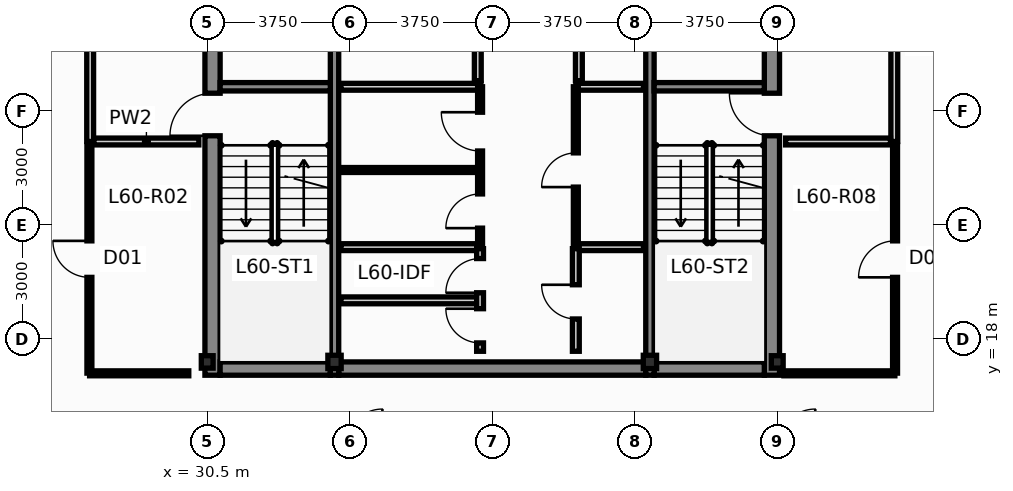
"""IFC4 building model, lengths in metres.
Left out: names, types, materials, properties, quantities, classifications, styles, units other than length and angle.
Written with IfcOpenShell. Run it as: python <this file> out.ifc"""

import sys

from ifc_helpers import new_model, si_unit, direction, frame, frame_2d, origin, origin_2d, place, context, subcontext, project, spatial, rectangle, hollow_rectangle, i_section, extrude, source, transform, mapped, element, fill, save


model = new_model("IFC4")
c1 = context("Model", 3, precision=1e-05, world=origin(), true_north=direction((0.0, 1.0)))
c2 = subcontext(c1, "Body", "Model", "MODEL_VIEW")
j1 = project(units=[si_unit("LENGTHUNIT", "METRE"), si_unit("PLANEANGLEUNIT", "RADIAN")], contexts=[c1])
p1 = place(None, origin())
s1 = spatial("IfcSite", under=j1, at=p1, CompositionType="ELEMENT")
p2 = place(p1, origin())
s2 = spatial("IfcBuilding", under=s1, at=p2, CompositionType="ELEMENT")
p3 = place(p2, frame((0.0, 0.0, 229.85)))
s3 = spatial("IfcBuildingStorey", under=s2, at=p3, CompositionType="ELEMENT", Elevation=229.85)
m1 = source(origin(), c2, "Body", "SweptSolid", [
    extrude(i_section(OverallWidth=0.311, OverallDepth=0.327, WebThickness=0.016, FlangeThickness=0.025, at=origin_2d()), origin(), (0.0, 0.0, 1.0), 3.65),
])
for number, where, z_axis, x_axis in (
    (1, (30.5, 17.4, 0.0), (0.0, 0.0, 1.0), (1.0, 0.0, 0.0)),
    (2, (45.5, 17.4, 0.0), (0.0, 0.0, 1.0), (1.0, 0.0, 0.0)),
):
    element("IfcColumn", number, at=place(p3, frame(where, z_axis=z_axis, x_axis=x_axis)), inside=s3, PredefinedType="COLUMN", context=c2, shape_type="MappedRepresentation", body=[
        mapped(m1, transform((0.0, 0.0, 0.0), scale=1.0)),
    ])
m2 = source(origin(), c2, "Body", "SweptSolid", [
    extrude(hollow_rectangle(XDim=0.35, YDim=0.35, WallThickness=0.016, at=origin_2d()), origin(), (0.0, 0.0, 1.0), 3.65),
])
for number, where, z_axis, x_axis in (
    (3, (33.85, 17.4, 0.0), (0.0, 0.0, 1.0), (1.0, 0.0, 0.0)),
    (4, (42.15, 17.4, 0.0), (0.0, 0.0, 1.0), (1.0, 0.0, 0.0)),
):
    element("IfcColumn", number, at=place(p3, frame(where, z_axis=z_axis, x_axis=x_axis)), inside=s3, PredefinedType="COLUMN", context=c2, shape_type="MappedRepresentation", body=[
        mapped(m2, transform((0.0, 0.0, 0.0), scale=1.0)),
    ])
p4 = place(p3, frame((30.64, 17.05, 0.0), z_axis=(0.0, 0.0, 1.0), x_axis=(0.0, 1.0, 0.0)))
e5 = element("IfcWall", 5, at=p4, inside=s3, PredefinedType="SHEAR", context=c2, shape_type="SweptSolid", body=[
    extrude(rectangle(XDim=13.125, YDim=0.4, at=frame_2d((6.562, 0.0))), origin(), (0.0, 0.0, 1.0), 3.65),
])
p5 = place(p4, frame((6.3, 0.0, 0.0)))
e6 = element("IfcOpeningElement", 6, at=p5, cuts=e5, PredefinedType="OPENING", context=c2, shape_type="SweptSolid", body=[
    extrude(rectangle(XDim=1.12, YDim=2.15, at=frame_2d((0.56, 1.075))), frame((0.0, 0.212, 0.0), z_axis=(0.0, -1.0, 0.0), x_axis=(1.0, 0.0, 0.0)), (0.0, 0.0, 1.0), 0.424),
])
p6 = place(p4, frame((10.75, 0.0, 0.0)))
e7 = element("IfcOpeningElement", 7, at=p6, cuts=e5, PredefinedType="OPENING", context=c2, shape_type="SweptSolid", body=[
    extrude(rectangle(XDim=1.2, YDim=2.2, at=frame_2d((0.6, 1.1))), frame((0.0, 0.212, 0.0), z_axis=(0.0, -1.0, 0.0), x_axis=(1.0, 0.0, 0.0)), (0.0, 0.0, 1.0), 0.424),
])
p7 = place(p3, frame((45.36, 17.05, 0.0), z_axis=(0.0, 0.0, 1.0), x_axis=(0.0, 1.0, 0.0)))
e8 = element("IfcWall", 8, at=p7, inside=s3, PredefinedType="SHEAR", context=c2, shape_type="SweptSolid", body=[
    extrude(rectangle(XDim=13.125, YDim=0.4, at=frame_2d((6.562, 0.0))), origin(), (0.0, 0.0, 1.0), 3.65),
])
p8 = place(p7, frame((6.3, 0.0, 0.0)))
e9 = element("IfcOpeningElement", 9, at=p8, cuts=e8, PredefinedType="OPENING", context=c2, shape_type="SweptSolid", body=[
    extrude(rectangle(XDim=1.12, YDim=2.15, at=frame_2d((0.56, 1.075))), frame((0.0, 0.212, 0.0), z_axis=(0.0, -1.0, 0.0), x_axis=(1.0, 0.0, 0.0)), (0.0, 0.0, 1.0), 0.424),
])
p9 = place(p7, frame((10.75, 0.0, 0.0)))
e10 = element("IfcOpeningElement", 10, at=p9, cuts=e8, PredefinedType="OPENING", context=c2, shape_type="SweptSolid", body=[
    extrude(rectangle(XDim=1.2, YDim=2.2, at=frame_2d((0.6, 1.1))), frame((0.0, 0.212, 0.0), z_axis=(0.0, -1.0, 0.0), x_axis=(1.0, 0.0, 0.0)), (0.0, 0.0, 1.0), 0.424),
])
p10 = place(p3, frame((30.84, 17.225, 0.0), z_axis=(0.0, 0.0, 1.0), x_axis=(1.0, 0.0, 0.0)))
e11 = element("IfcWall", 11, at=p10, inside=s3, PredefinedType="SHEAR", context=c2, shape_type="SweptSolid", body=[
    extrude(rectangle(XDim=2.9, YDim=0.35, at=frame_2d((1.45, 0.0))), origin(), (0.0, 0.0, 1.0), 3.65),
])
p11 = place(p3, frame((33.96, 17.225, 0.0), z_axis=(0.0, 0.0, 1.0), x_axis=(1.0, 0.0, 0.0)))
e12 = element("IfcWall", 12, at=p11, inside=s3, PredefinedType="SHEAR", context=c2, shape_type="SweptSolid", body=[
    extrude(rectangle(XDim=8.08, YDim=0.35, at=frame_2d((4.04, 0.0))), origin(), (0.0, 0.0, 1.0), 3.65),
])
p12 = place(p3, frame((42.26, 17.225, 0.0), z_axis=(0.0, 0.0, 1.0), x_axis=(1.0, 0.0, 0.0)))
e13 = element("IfcWall", 13, at=p12, inside=s3, PredefinedType="SHEAR", context=c2, shape_type="SweptSolid", body=[
    extrude(rectangle(XDim=2.9, YDim=0.35, at=frame_2d((1.45, 0.0))), origin(), (0.0, 0.0, 1.0), 3.65),
])
for number, where, z_axis, x_axis in (
    (14, (33.85, 17.05, 0.0), (0.0, 0.0, 1.0), (0.0, 1.0, 0.0)),
    (15, (42.15, 17.05, 0.0), (0.0, 0.0, 1.0), (0.0, 1.0, 0.0)),
):
    element("IfcWall", number, at=place(p3, frame(where, z_axis=z_axis, x_axis=x_axis)), inside=s3, PredefinedType="SHEAR", context=c2, shape_type="SweptSolid", body=[
        extrude(rectangle(XDim=13.125, YDim=0.22, at=frame_2d((6.562, 0.0))), origin(), (0.0, 0.0, 1.0), 3.65),
    ])
for number, where, z_axis, x_axis in (
    (16, (30.84, 24.64, 0.0), (0.0, 0.0, 1.0), (1.0, 0.0, 0.0)),
    (17, (42.26, 24.64, 0.0), (0.0, 0.0, 1.0), (1.0, 0.0, 0.0)),
):
    element("IfcWall", number, at=place(p3, frame(where, z_axis=z_axis, x_axis=x_axis)), inside=s3, PredefinedType="SHEAR", context=c2, shape_type="SweptSolid", body=[
        extrude(rectangle(XDim=2.9, YDim=0.22, at=frame_2d((1.45, 0.0))), origin(), (0.0, 0.0, 1.0), 3.65),
    ])
for number, where, z_axis, x_axis in (
    (18, (37.62, 24.8, 0.0), (0.0, 0.0, 1.0), (0.0, 1.0, 0.0)),
    (19, (40.28, 24.8, 0.0), (0.0, 0.0, 1.0), (0.0, 1.0, 0.0)),
):
    element("IfcWall", number, at=place(p3, frame(where, z_axis=z_axis, x_axis=x_axis)), inside=s3, PredefinedType="PARTITIONING", context=c2, shape_type="SweptSolid", body=[
        extrude(rectangle(XDim=2.0, YDim=0.18, at=frame_2d((1.0, 0.0))), origin(), (0.0, 0.0, 1.0), 3.4),
    ])
p13 = place(p3, frame((34.02, 24.64, 0.0), z_axis=(0.0, 0.0, 1.0), x_axis=(1.0, 0.0, 0.0)))
e20 = element("IfcWall", 20, at=p13, inside=s3, PredefinedType="PARTITIONING", context=c2, shape_type="SweptSolid", body=[
    extrude(rectangle(XDim=3.68, YDim=0.18, at=frame_2d((1.84, 0.0))), origin(), (0.0, 0.0, 1.0), 3.4),
])
p14 = place(p3, frame((40.2, 24.64, 0.0), z_axis=(0.0, 0.0, 1.0), x_axis=(1.0, 0.0, 0.0)))
e21 = element("IfcWall", 21, at=p14, inside=s3, PredefinedType="PARTITIONING", context=c2, shape_type="SweptSolid", body=[
    extrude(rectangle(XDim=1.78, YDim=0.18, at=frame_2d((0.89, 0.0))), origin(), (0.0, 0.0, 1.0), 3.4),
])
p15 = place(p3, frame((27.42, 23.2, 0.0), z_axis=(0.0, 0.0, 1.0), x_axis=(0.0, 1.0, 0.0)))
e22 = element("IfcWall", 22, at=p15, inside=s3, PredefinedType="PARTITIONING", context=c2, shape_type="SweptSolid", body=[
    extrude(rectangle(XDim=6.4, YDim=0.18, at=frame_2d((3.2, 0.0))), origin(), (0.0, 0.0, 1.0), 3.129),
])
p16 = place(p15, frame((2.65, 0.0, 0.0)))
e23 = element("IfcOpeningElement", 23, at=p16, cuts=e22, PredefinedType="OPENING", context=c2, shape_type="SweptSolid", body=[
    extrude(rectangle(XDim=1.05, YDim=2.15, at=frame_2d((0.525, 1.075))), frame((0.0, 0.102, 0.0), z_axis=(0.0, -1.0, 0.0), x_axis=(1.0, 0.0, 0.0)), (0.0, 0.0, 1.0), 0.204),
])
p17 = place(p3, frame((27.52, 23.2, 0.0), z_axis=(0.0, 0.0, 1.0), x_axis=(1.0, 0.0, 0.0)))
e24 = element("IfcWall", 24, at=p17, inside=s3, PredefinedType="PARTITIONING", context=c2, shape_type="SweptSolid", body=[
    extrude(rectangle(XDim=2.76, YDim=0.18, at=frame_2d((1.38, 0.0))), origin(), (0.0, 0.0, 1.0), 3.4),
])
p18 = place(p3, frame((48.58, 23.2, 0.0), z_axis=(0.0, 0.0, 1.0), x_axis=(0.0, 1.0, 0.0)))
e25 = element("IfcWall", 25, at=p18, inside=s3, PredefinedType="PARTITIONING", context=c2, shape_type="SweptSolid", body=[
    extrude(rectangle(XDim=6.4, YDim=0.18, at=frame_2d((3.2, 0.0))), origin(), (0.0, 0.0, 1.0), 3.129),
])
p19 = place(p18, frame((2.65, 0.0, 0.0)))
e26 = element("IfcOpeningElement", 26, at=p19, cuts=e25, PredefinedType="OPENING", context=c2, shape_type="SweptSolid", body=[
    extrude(rectangle(XDim=1.05, YDim=2.15, at=frame_2d((0.525, 1.075))), frame((0.0, 0.102, 0.0), z_axis=(0.0, -1.0, 0.0), x_axis=(1.0, 0.0, 0.0)), (0.0, 0.0, 1.0), 0.204),
])
p20 = place(p3, frame((45.72, 23.2, 0.0), z_axis=(0.0, 0.0, 1.0), x_axis=(1.0, 0.0, 0.0)))
e27 = element("IfcWall", 27, at=p20, inside=s3, PredefinedType="PARTITIONING", context=c2, shape_type="SweptSolid", body=[
    extrude(rectangle(XDim=2.76, YDim=0.18, at=frame_2d((1.38, 0.0))), origin(), (0.0, 0.0, 1.0), 3.4),
])
p21 = place(p3, frame((34.02, 20.42, 0.0), z_axis=(0.0, 0.0, 1.0), x_axis=(1.0, 0.0, 0.0)))
e28 = element("IfcWall", 28, at=p21, inside=s3, PredefinedType="PARTITIONING", context=c2, shape_type="SweptSolid", body=[
    extrude(rectangle(XDim=3.64, YDim=0.18, at=frame_2d((1.82, 0.0))), origin(), (0.0, 0.0, 1.0), 3.4),
])
p22 = place(p3, frame((40.22, 20.42, 0.0), z_axis=(0.0, 0.0, 1.0), x_axis=(1.0, 0.0, 0.0)))
e29 = element("IfcWall", 29, at=p22, inside=s3, PredefinedType="PARTITIONING", context=c2, shape_type="SweptSolid", body=[
    extrude(rectangle(XDim=1.76, YDim=0.18, at=frame_2d((0.88, 0.0))), origin(), (0.0, 0.0, 1.0), 3.4),
])
p23 = place(p3, frame((34.02, 22.45, 0.0), z_axis=(0.0, 0.0, 1.0), x_axis=(1.0, 0.0, 0.0)))
e30 = element("IfcWall", 30, at=p23, inside=s3, PredefinedType="PARTITIONING", context=c2, shape_type="SweptSolid", body=[
    extrude(rectangle(XDim=3.58, YDim=0.13, at=frame_2d((1.79, 0.0))), origin(), (0.0, 0.0, 1.0), 3.4),
])
p24 = place(p3, frame((37.68, 20.5, 0.0), z_axis=(0.0, 0.0, 1.0), x_axis=(0.0, 1.0, 0.0)))
e31 = element("IfcWall", 31, at=p24, inside=s3, PredefinedType="PARTITIONING", context=c2, shape_type="SweptSolid", body=[
    extrude(rectangle(XDim=4.14, YDim=0.13, at=frame_2d((2.07, 0.0))), origin(), (0.0, 0.0, 1.0), 3.4),
])
p25 = place(p24, frame((0.42, 0.0, 0.0)))
e32 = element("IfcOpeningElement", 32, at=p25, cuts=e31, PredefinedType="OPENING", context=c2, shape_type="SweptSolid", body=[
    extrude(rectangle(XDim=0.9, YDim=2.1, at=frame_2d((0.45, 1.05))), frame((0.0, 0.077, 0.0), z_axis=(0.0, -1.0, 0.0), x_axis=(1.0, 0.0, 0.0)), (0.0, 0.0, 1.0), 0.154),
])
p26 = place(p24, frame((2.45, 0.0, 0.0)))
e33 = element("IfcOpeningElement", 33, at=p26, cuts=e31, PredefinedType="OPENING", context=c2, shape_type="SweptSolid", body=[
    extrude(rectangle(XDim=1.02, YDim=2.15, at=frame_2d((0.51, 1.075))), frame((0.0, 0.077, 0.0), z_axis=(0.0, -1.0, 0.0), x_axis=(1.0, 0.0, 0.0)), (0.0, 0.0, 1.0), 0.154),
])
p27 = place(p3, frame((40.2, 20.5, 0.0), z_axis=(0.0, 0.0, 1.0), x_axis=(0.0, 1.0, 0.0)))
e34 = element("IfcWall", 34, at=p27, inside=s3, PredefinedType="PARTITIONING", context=c2, shape_type="SweptSolid", body=[
    extrude(rectangle(XDim=4.14, YDim=0.13, at=frame_2d((2.07, 0.0))), origin(), (0.0, 0.0, 1.0), 3.4),
])
p28 = place(p27, frame((1.5, 0.0, 0.0)))
e35 = element("IfcOpeningElement", 35, at=p28, cuts=e34, PredefinedType="OPENING", context=c2, shape_type="SweptSolid", body=[
    extrude(rectangle(XDim=0.9, YDim=2.1, at=frame_2d((0.45, 1.05))), frame((0.0, 0.077, 0.0), z_axis=(0.0, -1.0, 0.0), x_axis=(1.0, 0.0, 0.0)), (0.0, 0.0, 1.0), 0.154),
])
p29 = place(p3, frame((34.02, 19.02, 0.0), z_axis=(0.0, 0.0, 1.0), x_axis=(1.0, 0.0, 0.0)))
e36 = element("IfcWall", 36, at=p29, inside=s3, PredefinedType="PARTITIONING", context=c2, shape_type="SweptSolid", body=[
    extrude(rectangle(XDim=3.58, YDim=0.18, at=frame_2d((1.79, 0.0))), origin(), (0.0, 0.0, 1.0), 3.4),
])
p30 = place(p3, frame((37.68, 17.68, 0.0), z_axis=(0.0, 0.0, 1.0), x_axis=(0.0, 1.0, 0.0)))
e37 = element("IfcWall", 37, at=p30, inside=s3, PredefinedType="PARTITIONING", context=c2, shape_type="SweptSolid", body=[
    extrude(rectangle(XDim=2.7, YDim=0.18, at=frame_2d((1.35, 0.0))), origin(), (0.0, 0.0, 1.0), 3.4),
])
p31 = place(p30, frame((0.22, 0.0, 0.0)))
e38 = element("IfcOpeningElement", 38, at=p31, cuts=e37, PredefinedType="OPENING", context=c2, shape_type="SweptSolid", body=[
    extrude(rectangle(XDim=0.9, YDim=2.1, at=frame_2d((0.45, 1.05))), frame((0.0, 0.102, 0.0), z_axis=(0.0, -1.0, 0.0), x_axis=(1.0, 0.0, 0.0)), (0.0, 0.0, 1.0), 0.204),
])
p32 = place(p30, frame((1.54, 0.0, 0.0)))
e39 = element("IfcOpeningElement", 39, at=p32, cuts=e37, PredefinedType="OPENING", context=c2, shape_type="SweptSolid", body=[
    extrude(rectangle(XDim=0.9, YDim=2.1, at=frame_2d((0.45, 1.05))), frame((0.0, 0.102, 0.0), z_axis=(0.0, -1.0, 0.0), x_axis=(1.0, 0.0, 0.0)), (0.0, 0.0, 1.0), 0.204),
])
p33 = place(p3, frame((40.2, 17.68, 0.0), z_axis=(0.0, 0.0, 1.0), x_axis=(0.0, 1.0, 0.0)))
e40 = element("IfcWall", 40, at=p33, inside=s3, PredefinedType="PARTITIONING", context=c2, shape_type="SweptSolid", body=[
    extrude(rectangle(XDim=2.7, YDim=0.18, at=frame_2d((1.35, 0.0))), origin(), (0.0, 0.0, 1.0), 3.4),
])
p34 = place(p33, frame((0.85, 0.0, 0.0)))
e41 = element("IfcOpeningElement", 41, at=p34, cuts=e40, PredefinedType="OPENING", context=c2, shape_type="SweptSolid", body=[
    extrude(rectangle(XDim=0.9, YDim=2.1, at=frame_2d((0.45, 1.05))), frame((0.0, 0.102, 0.0), z_axis=(0.0, -1.0, 0.0), x_axis=(1.0, 0.0, 0.0)), (0.0, 0.0, 1.0), 0.204),
])
p35 = place(p3, frame((27.4, 17.105, 0.0), z_axis=(0.0, 0.0, 1.0), x_axis=(0.0, 1.0, 0.0)))
e42 = element("IfcWall", 42, at=p35, inside=s3, PredefinedType="PARTITIONING", context=c2, shape_type="SweptSolid", body=[
    extrude(rectangle(XDim=6.0, YDim=0.13, at=frame_2d((3.0, 0.0))), origin(), (0.0, 0.0, 1.0), 3.4),
])
p36 = place(p35, frame((2.52, 0.0, 0.0)))
e43 = element("IfcOpeningElement", 43, at=p36, cuts=e42, PredefinedType="OPENING", context=c2, shape_type="SweptSolid", body=[
    extrude(rectangle(XDim=0.96, YDim=2.15, at=frame_2d((0.48, 1.075))), frame((0.0, 0.077, 0.0), z_axis=(0.0, -1.0, 0.0), x_axis=(1.0, 0.0, 0.0)), (0.0, 0.0, 1.0), 0.154),
])
p37 = place(p3, frame((48.6, 17.105, 0.0), z_axis=(0.0, 0.0, 1.0), x_axis=(0.0, 1.0, 0.0)))
e44 = element("IfcWall", 44, at=p37, inside=s3, PredefinedType="PARTITIONING", context=c2, shape_type="SweptSolid", body=[
    extrude(rectangle(XDim=6.0, YDim=0.13, at=frame_2d((3.0, 0.0))), origin(), (0.0, 0.0, 1.0), 3.4),
])
p38 = place(p37, frame((2.52, 0.0, 0.0)))
e45 = element("IfcOpeningElement", 45, at=p38, cuts=e44, PredefinedType="OPENING", context=c2, shape_type="SweptSolid", body=[
    extrude(rectangle(XDim=0.96, YDim=2.15, at=frame_2d((0.48, 1.075))), frame((0.0, 0.077, 0.0), z_axis=(0.0, -1.0, 0.0), x_axis=(1.0, 0.0, 0.0)), (0.0, 0.0, 1.0), 0.154),
])
p39 = place(p3, frame((45.675, 17.1, 0.0), z_axis=(0.0, 0.0, 1.0), x_axis=(1.0, 0.0, 0.0)))
e46 = element("IfcWall", 46, at=p39, inside=s3, PredefinedType="PARTITIONING", context=c2, shape_type="SweptSolid", body=[
    extrude(rectangle(XDim=2.92, YDim=0.13, at=frame_2d((1.46, 0.0))), origin(), (0.0, 0.0, 1.0), 2.985),
])
p40 = place(p3, frame((30.015, 17.1, 0.0), z_axis=(0.0, 0.0, 1.0), x_axis=(-1.0, 0.0, 0.0)))
e47 = element("IfcWall", 47, at=p40, inside=s3, PredefinedType="PARTITIONING", context=c2, shape_type="SweptSolid", body=[
    extrude(rectangle(XDim=2.61, YDim=0.13, at=frame_2d((1.305, 0.0))), origin(), (0.0, 0.0, 1.0), 2.985),
])
p41 = place(p5, origin())
e48 = element("IfcDoor", 48, at=p41, inside=s3, OperationType="SINGLE_SWING_LEFT", PredefinedType="DOOR", context=c2, shape_type="SweptSolid", body=[
    extrude(rectangle(XDim=1.12, YDim=2.15, at=frame_2d((0.56, 1.075))), frame((0.0, 0.025, 0.0), z_axis=(0.0, -1.0, 0.0), x_axis=(1.0, 0.0, 0.0)), (0.0, 0.0, 1.0), 0.05),
])
fill(e6, e48)
p42 = place(p8, origin())
e49 = element("IfcDoor", 49, at=p42, inside=s3, OperationType="SINGLE_SWING_RIGHT", PredefinedType="DOOR", context=c2, shape_type="SweptSolid", body=[
    extrude(rectangle(XDim=1.12, YDim=2.15, at=frame_2d((0.56, 1.075))), frame((0.0, 0.025, 0.0), z_axis=(0.0, -1.0, 0.0), x_axis=(1.0, 0.0, 0.0)), (0.0, 0.0, 1.0), 0.05),
])
fill(e9, e49)
p43 = place(p25, origin())
e50 = element("IfcDoor", 50, at=p43, inside=s3, OperationType="SINGLE_SWING_LEFT", PredefinedType="DOOR", context=c2, shape_type="SweptSolid", body=[
    extrude(rectangle(XDim=0.9, YDim=2.1, at=frame_2d((0.45, 1.05))), frame((0.0, 0.025, 0.0), z_axis=(0.0, -1.0, 0.0), x_axis=(1.0, 0.0, 0.0)), (0.0, 0.0, 1.0), 0.05),
])
fill(e32, e50)
p44 = place(p26, origin())
e51 = element("IfcDoor", 51, at=p44, inside=s3, OperationType="SINGLE_SWING_RIGHT", PredefinedType="DOOR", context=c2, shape_type="SweptSolid", body=[
    extrude(rectangle(XDim=1.02, YDim=2.15, at=frame_2d((0.51, 1.075))), frame((0.0, 0.025, 0.0), z_axis=(0.0, -1.0, 0.0), x_axis=(1.0, 0.0, 0.0)), (0.0, 0.0, 1.0), 0.05),
])
fill(e33, e51)
p45 = place(p28, origin())
e52 = element("IfcDoor", 52, at=p45, inside=s3, OperationType="SINGLE_SWING_LEFT", PredefinedType="DOOR", context=c2, shape_type="SweptSolid", body=[
    extrude(rectangle(XDim=0.9, YDim=2.1, at=frame_2d((0.45, 1.05))), frame((0.0, 0.025, 0.0), z_axis=(0.0, -1.0, 0.0), x_axis=(1.0, 0.0, 0.0)), (0.0, 0.0, 1.0), 0.05),
])
fill(e35, e52)
p46 = place(p31, origin())
e53 = element("IfcDoor", 53, at=p46, inside=s3, OperationType="SINGLE_SWING_RIGHT", PredefinedType="DOOR", context=c2, shape_type="SweptSolid", body=[
    extrude(rectangle(XDim=0.9, YDim=2.1, at=frame_2d((0.45, 1.05))), frame((0.0, 0.025, 0.0), z_axis=(0.0, -1.0, 0.0), x_axis=(1.0, 0.0, 0.0)), (0.0, 0.0, 1.0), 0.05),
])
fill(e38, e53)
p47 = place(p32, origin())
e54 = element("IfcDoor", 54, at=p47, inside=s3, OperationType="SINGLE_SWING_LEFT", PredefinedType="DOOR", context=c2, shape_type="SweptSolid", body=[
    extrude(rectangle(XDim=0.9, YDim=2.1, at=frame_2d((0.45, 1.05))), frame((0.0, 0.025, 0.0), z_axis=(0.0, -1.0, 0.0), x_axis=(1.0, 0.0, 0.0)), (0.0, 0.0, 1.0), 0.05),
])
fill(e39, e54)
p48 = place(p34, origin())
e55 = element("IfcDoor", 55, at=p48, inside=s3, OperationType="SINGLE_SWING_RIGHT", PredefinedType="DOOR", context=c2, shape_type="SweptSolid", body=[
    extrude(rectangle(XDim=0.9, YDim=2.1, at=frame_2d((0.45, 1.05))), frame((0.0, 0.025, 0.0), z_axis=(0.0, -1.0, 0.0), x_axis=(1.0, 0.0, 0.0)), (0.0, 0.0, 1.0), 0.05),
])
fill(e41, e55)
p49 = place(p36, origin())
e56 = element("IfcDoor", 56, at=p49, inside=s3, OperationType="SINGLE_SWING_RIGHT", PredefinedType="DOOR", context=c2, shape_type="SweptSolid", body=[
    extrude(rectangle(XDim=0.96, YDim=2.15, at=frame_2d((0.48, 1.075))), frame((0.0, 0.025, 0.0), z_axis=(0.0, -1.0, 0.0), x_axis=(1.0, 0.0, 0.0)), (0.0, 0.0, 1.0), 0.05),
])
fill(e43, e56)
p50 = place(p38, origin())
e57 = element("IfcDoor", 57, at=p50, inside=s3, OperationType="SINGLE_SWING_LEFT", PredefinedType="DOOR", context=c2, shape_type="SweptSolid", body=[
    extrude(rectangle(XDim=0.96, YDim=2.15, at=frame_2d((0.48, 1.075))), frame((0.0, 0.025, 0.0), z_axis=(0.0, -1.0, 0.0), x_axis=(1.0, 0.0, 0.0)), (0.0, 0.0, 1.0), 0.05),
])
fill(e45, e57)
save(model, sys.argv[1])
